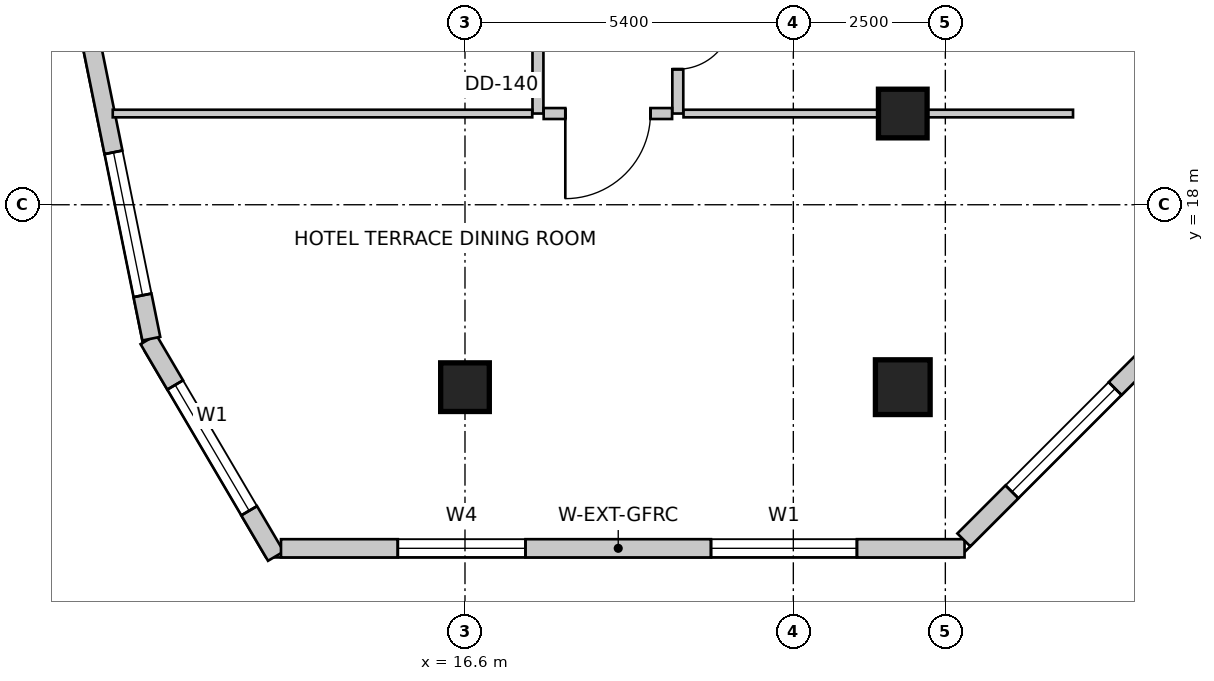
"""IFC4 building model, lengths in metres.
Left out: names, types, materials, properties, quantities, classifications, styles, units other than length and angle.
Written with IfcOpenShell. Run it as: python <this file> out.ifc"""

import sys

from ifc_helpers import new_model, si_unit, direction, frame, frame_2d, origin, origin_2d, place, context, subcontext, project, spatial, rectangle, extrude, source, transform, mapped, element, fill, save


model = new_model("IFC4")
c1 = context("Model", 3, precision=1e-05, world=origin(), true_north=direction((0.0, 1.0)))
c2 = subcontext(c1, "Body", "Model", "MODEL_VIEW")
j1 = project(units=[si_unit("LENGTHUNIT", "METRE"), si_unit("PLANEANGLEUNIT", "RADIAN")], contexts=[c1])
p1 = place(None, origin())
s1 = spatial("IfcSite", under=j1, at=p1, CompositionType="ELEMENT")
p2 = place(p1, origin())
s2 = spatial("IfcBuilding", under=s1, at=p2, CompositionType="ELEMENT")
p3 = place(p2, frame((0.0, 0.0, 150.2)))
s3 = spatial("IfcBuildingStorey", under=s2, at=p3, CompositionType="ELEMENT", Elevation=150.2)
m1 = source(origin(), c2, "Body", "SweptSolid", [
    extrude(rectangle(XDim=0.8, YDim=0.8, at=origin_2d()), origin(), (0.0, 0.0, 1.0), 3.6),
])
p4 = place(p3, frame((23.8, 19.5, 0.0), z_axis=(0.0, 0.0, 1.0), x_axis=(1.0, 0.0, 0.0)))
e1 = element("IfcColumn", 1, at=p4, inside=s3, PredefinedType="COLUMN", context=c2, shape_type="MappedRepresentation", body=[
    mapped(m1, transform((0.0, 0.0, 0.0), scale=1.0)),
])
m2 = source(origin(), c2, "Body", "SweptSolid", [
    extrude(rectangle(XDim=0.9, YDim=0.9, at=origin_2d()), origin(), (0.0, 0.0, 1.0), 3.6),
])
p5 = place(p3, frame((23.8, 15.0, 0.0), z_axis=(0.0, 0.0, 1.0), x_axis=(1.0, 0.0, 0.0)))
e2 = element("IfcColumn", 2, at=p5, inside=s3, PredefinedType="COLUMN", context=c2, shape_type="MappedRepresentation", body=[
    mapped(m2, transform((0.0, 0.0, 0.0), scale=1.0)),
])
p6 = place(p3, frame((16.6, 15.0, 0.0), z_axis=(0.0, 0.0, 1.0), x_axis=(1.0, 0.0, 0.0)))
e3 = element("IfcColumn", 3, at=p6, inside=s3, PredefinedType="COLUMN", context=c2, shape_type="MappedRepresentation", body=[
    mapped(m1, transform((0.0, 0.0, 0.0), scale=1.0)),
])
p7 = place(p3, frame((11.394, 15.784, 0.0), z_axis=(0.0, 0.0, 1.0), x_axis=(0.50698915279, -0.861952434275, 0.0)))
e4 = element("IfcWall", 4, at=p7, inside=s3, PredefinedType="SOLIDWALL", context=c2, shape_type="SweptSolid", body=[
    extrude(rectangle(XDim=4.134, YDim=0.3, at=frame_2d((2.067, 0.0))), origin(), (0.0, 0.0, 1.0), 3.35),
])
m3 = source(origin(), c2, "Body", "SweptSolid", [
    extrude(rectangle(XDim=2.4, YDim=2.2, at=frame_2d((1.2, 1.1))), frame((0.0, 0.16, 0.0), z_axis=(0.0, -1.0, 0.0), x_axis=(1.0, 0.0, 0.0)), (0.0, 0.0, 1.0), 0.32),
])
p8 = place(p7, frame((0.867, 0.0, 0.85)))
e5 = element("IfcOpeningElement", 5, at=p8, cuts=e4, PredefinedType="OPENING", context=c2, shape_type="MappedRepresentation", body=[
    mapped(m3, transform((0.0, 0.0, 0.0), scale=1.0)),
])
p9 = place(p3, frame((13.574, 12.35, 0.0), z_axis=(0.0, 0.0, 1.0), x_axis=(1.0, 0.0, 0.0)))
e6 = element("IfcWall", 6, at=p9, inside=s3, PredefinedType="SOLIDWALL", context=c2, shape_type="SweptSolid", body=[
    extrude(rectangle(XDim=11.242, YDim=0.3, at=frame_2d((5.621, 0.0))), origin(), (0.0, 0.0, 1.0), 3.35),
])
m4 = source(origin(), c2, "Body", "SweptSolid", [
    extrude(rectangle(XDim=2.1, YDim=2.0, at=frame_2d((1.05, 1.0))), frame((0.0, 0.16, 0.0), z_axis=(0.0, -1.0, 0.0), x_axis=(1.0, 0.0, 0.0)), (0.0, 0.0, 1.0), 0.32),
])
p10 = place(p9, frame((1.921, 0.0, 0.85)))
e7 = element("IfcOpeningElement", 7, at=p10, cuts=e6, PredefinedType="OPENING", context=c2, shape_type="MappedRepresentation", body=[
    mapped(m4, transform((0.0, 0.0, 0.0), scale=1.0)),
])
p11 = place(p9, frame((7.072, 0.0, 0.85)))
e8 = element("IfcOpeningElement", 8, at=p11, cuts=e6, PredefinedType="OPENING", context=c2, shape_type="MappedRepresentation", body=[
    mapped(m3, transform((0.0, 0.0, 0.0), scale=1.0)),
])
p12 = place(p3, frame((24.804, 12.488, 0.0), z_axis=(0.0, 0.0, 1.0), x_axis=(0.70708046583, 0.707133095564, 0.0)))
e9 = element("IfcWall", 9, at=p12, inside=s3, PredefinedType="SOLIDWALL", context=c2, shape_type="SweptSolid", body=[
    extrude(rectangle(XDim=4.639, YDim=0.3, at=frame_2d((2.319, 0.0))), origin(), (0.0, 0.0, 1.0), 3.35),
])
p13 = place(p12, frame((1.119, 0.0, 0.85)))
e10 = element("IfcOpeningElement", 10, at=p13, cuts=e9, PredefinedType="OPENING", context=c2, shape_type="MappedRepresentation", body=[
    mapped(m3, transform((0.0, 0.0, 0.0), scale=1.0)),
])
p14 = place(p3, frame((8.187, 31.834, 0.0), z_axis=(0.0, 0.0, 1.0), x_axis=(0.198869838988, -0.980025911464, 0.0)))
e11 = element("IfcWall", 11, at=p14, inside=s3, PredefinedType="SOLIDWALL", context=c2, shape_type="SweptSolid", body=[
    extrude(rectangle(XDim=16.363, YDim=0.3, at=frame_2d((8.182, 0.0))), origin(), (0.0, 0.0, 1.0), 3.35),
])
m5 = source(origin(), c2, "Body", "SweptSolid", [
    extrude(rectangle(XDim=1.5, YDim=1.8, at=frame_2d((0.75, 0.9))), frame((0.0, 0.16, 0.0), z_axis=(0.0, -1.0, 0.0), x_axis=(1.0, 0.0, 0.0)), (0.0, 0.0, 1.0), 0.32),
])
p15 = place(p14, frame((0.981, 0.0, 0.85)))
e12 = element("IfcOpeningElement", 12, at=p15, cuts=e11, PredefinedType="OPENING", context=c2, shape_type="MappedRepresentation", body=[
    mapped(m5, transform((0.0, 0.0, 0.0), scale=1.0)),
])
p16 = place(p14, frame((4.195, 0.0, 0.85)))
e13 = element("IfcOpeningElement", 13, at=p16, cuts=e11, PredefinedType="OPENING", context=c2, shape_type="MappedRepresentation", body=[
    mapped(m3, transform((0.0, 0.0, 0.0), scale=1.0)),
])
p17 = place(p14, frame((9.007, 0.0, 0.85)))
e14 = element("IfcOpeningElement", 14, at=p17, cuts=e11, PredefinedType="OPENING", context=c2, shape_type="MappedRepresentation", body=[
    mapped(m4, transform((0.0, 0.0, 0.0), scale=1.0)),
])
p18 = place(p14, frame((13.236, 0.0, 0.85)))
e15 = element("IfcOpeningElement", 15, at=p18, cuts=e11, PredefinedType="OPENING", context=c2, shape_type="MappedRepresentation", body=[
    mapped(m3, transform((0.0, 0.0, 0.0), scale=1.0)),
])
p19 = place(p3, frame((17.8, 19.5, 0.0), z_axis=(0.0, 0.0, 1.0), x_axis=(0.0, 1.0, 0.0)))
e16 = element("IfcWall", 16, at=p19, inside=s3, PredefinedType="PARTITIONING", context=c2, shape_type="SweptSolid", body=[
    extrude(rectangle(XDim=11.656, YDim=0.18, at=frame_2d((5.828, 0.0))), origin(), (0.0, 0.0, 1.0), 2.803),
])
m6 = source(origin(), c2, "Body", "SweptSolid", [
    extrude(rectangle(XDim=0.9, YDim=2.15, at=frame_2d((0.45, 1.075))), frame((0.0, 0.1, 0.0), z_axis=(0.0, -1.0, 0.0), x_axis=(1.0, 0.0, 0.0)), (0.0, 0.0, 1.0), 0.2),
])
p20 = place(p19, frame((5.378, 0.0, 0.0)))
e17 = element("IfcOpeningElement", 17, at=p20, cuts=e16, PredefinedType="OPENING", context=c2, shape_type="MappedRepresentation", body=[
    mapped(m6, transform((0.0, 0.0, 0.0), scale=1.0)),
])
p21 = place(p3, frame((20.1, 21.858, 0.0), z_axis=(0.0, 0.0, 1.0), x_axis=(0.0, -1.0, 0.0)))
e18 = element("IfcWall", 18, at=p21, inside=s3, PredefinedType="PARTITIONING", context=c2, shape_type="SweptSolid", body=[
    extrude(rectangle(XDim=2.358, YDim=0.18, at=frame_2d((1.179, 0.0))), origin(), (0.0, 0.0, 1.0), 2.879),
])
p22 = place(p21, frame((0.729, 0.0, 0.0)))
e19 = element("IfcOpeningElement", 19, at=p22, cuts=e18, PredefinedType="OPENING", context=c2, shape_type="MappedRepresentation", body=[
    mapped(m6, transform((0.0, 0.0, 0.0), scale=1.0)),
])
p23 = place(p3, frame((20.006, 19.5, 0.0), z_axis=(0.0, 0.0, 1.0), x_axis=(-1.0, 0.0, 0.0)))
e20 = element("IfcWall", 20, at=p23, inside=s3, PredefinedType="PARTITIONING", context=c2, shape_type="SweptSolid", body=[
    extrude(rectangle(XDim=2.112, YDim=0.18, at=frame_2d((1.056, 0.0))), origin(), (0.0, 0.0, 1.0), 3.35),
])
m7 = source(origin(), c2, "Body", "SweptSolid", [
    extrude(rectangle(XDim=1.4, YDim=2.15, at=frame_2d((0.7, 1.075))), frame((0.0, 0.1, 0.0), z_axis=(0.0, -1.0, 0.0), x_axis=(1.0, 0.0, 0.0)), (0.0, 0.0, 1.0), 0.2),
])
p24 = place(p23, frame((0.356, 0.0, 0.0)))
e21 = element("IfcOpeningElement", 21, at=p24, cuts=e20, PredefinedType="OPENING", context=c2, shape_type="MappedRepresentation", body=[
    mapped(m7, transform((0.0, 0.0, 0.0), scale=1.0)),
])
p25 = place(p3, frame((17.706, 19.5, 0.0), z_axis=(0.0, 0.0, 1.0), x_axis=(-1.0, 0.0, 0.0)))
e22 = element("IfcWall", 22, at=p25, inside=s3, PredefinedType="PARTITIONING", context=c2, shape_type="SweptSolid", body=[
    extrude(rectangle(XDim=6.899, YDim=0.125, at=frame_2d((3.45, 0.0))), origin(), (0.0, 0.0, 1.0), 3.35),
])
p26 = place(p3, frame((26.6, 19.5, 0.0), z_axis=(0.0, 0.0, 1.0), x_axis=(-1.0, 0.0, 0.0)))
e23 = element("IfcWall", 23, at=p26, inside=s3, PredefinedType="PARTITIONING", context=c2, shape_type="SweptSolid", body=[
    extrude(rectangle(XDim=6.406, YDim=0.125, at=frame_2d((3.203, 0.0))), origin(), (0.0, 0.0, 1.0), 2.492),
])
m8 = source(origin(), c2, "Body", "SweptSolid", [
    extrude(rectangle(XDim=2.4, YDim=2.2, at=frame_2d((1.2, 1.1))), frame((0.0, -0.015, 0.0), z_axis=(0.0, -1.0, 0.0), x_axis=(1.0, 0.0, 0.0)), (0.0, 0.0, 1.0), 0.06),
])
p27 = place(p8, origin())
e24 = element("IfcWindow", 24, at=p27, inside=s3, PartitioningType="SINGLE_PANEL", PredefinedType="WINDOW", context=c2, shape_type="MappedRepresentation", body=[
    mapped(m8, transform((0.0, 0.0, 0.0), scale=1.0)),
])
fill(e5, e24)
m9 = source(origin(), c2, "Body", "SweptSolid", [
    extrude(rectangle(XDim=2.1, YDim=2.0, at=frame_2d((1.05, 1.0))), frame((0.0, -0.015, 0.0), z_axis=(0.0, -1.0, 0.0), x_axis=(1.0, 0.0, 0.0)), (0.0, 0.0, 1.0), 0.06),
])
p28 = place(p10, origin())
e25 = element("IfcWindow", 25, at=p28, inside=s3, PartitioningType="SINGLE_PANEL", PredefinedType="WINDOW", context=c2, shape_type="MappedRepresentation", body=[
    mapped(m9, transform((0.0, 0.0, 0.0), scale=1.0)),
])
fill(e7, e25)
p29 = place(p11, origin())
e26 = element("IfcWindow", 26, at=p29, inside=s3, PartitioningType="SINGLE_PANEL", PredefinedType="WINDOW", context=c2, shape_type="MappedRepresentation", body=[
    mapped(m8, transform((0.0, 0.0, 0.0), scale=1.0)),
])
fill(e8, e26)
p30 = place(p13, origin())
e27 = element("IfcWindow", 27, at=p30, inside=s3, PartitioningType="SINGLE_PANEL", PredefinedType="WINDOW", context=c2, shape_type="MappedRepresentation", body=[
    mapped(m8, transform((0.0, 0.0, 0.0), scale=1.0)),
])
fill(e10, e27)
p31 = place(p18, origin())
e28 = element("IfcWindow", 28, at=p31, inside=s3, PartitioningType="SINGLE_PANEL", PredefinedType="WINDOW", context=c2, shape_type="MappedRepresentation", body=[
    mapped(m8, transform((0.0, 0.0, 0.0), scale=1.0)),
])
fill(e15, e28)
m10 = source(origin(), c2, "Body", "SweptSolid", [
    extrude(rectangle(XDim=0.9, YDim=2.15, at=frame_2d((0.45, 1.075))), frame((0.0, 0.025, 0.0), z_axis=(0.0, -1.0, 0.0), x_axis=(1.0, 0.0, 0.0)), (0.0, 0.0, 1.0), 0.05),
])
p32 = place(p22, origin())
e29 = element("IfcDoor", 29, at=p32, inside=s3, OperationType="SINGLE_SWING_LEFT", PredefinedType="DOOR", context=c2, shape_type="MappedRepresentation", body=[
    mapped(m10, transform((0.0, 0.0, 0.0), scale=1.0)),
])
fill(e19, e29)
m11 = source(origin(), c2, "Body", "SweptSolid", [
    extrude(rectangle(XDim=1.4, YDim=2.15, at=frame_2d((0.7, 1.075))), frame((0.0, 0.025, 0.0), z_axis=(0.0, -1.0, 0.0), x_axis=(1.0, 0.0, 0.0)), (0.0, 0.0, 1.0), 0.05),
])
p33 = place(p24, origin())
e30 = element("IfcDoor", 30, at=p33, inside=s3, OperationType="SINGLE_SWING_RIGHT", PredefinedType="DOOR", context=c2, shape_type="MappedRepresentation", body=[
    mapped(m11, transform((0.0, 0.0, 0.0), scale=1.0)),
])
fill(e21, e30)
save(model, sys.argv[1])
